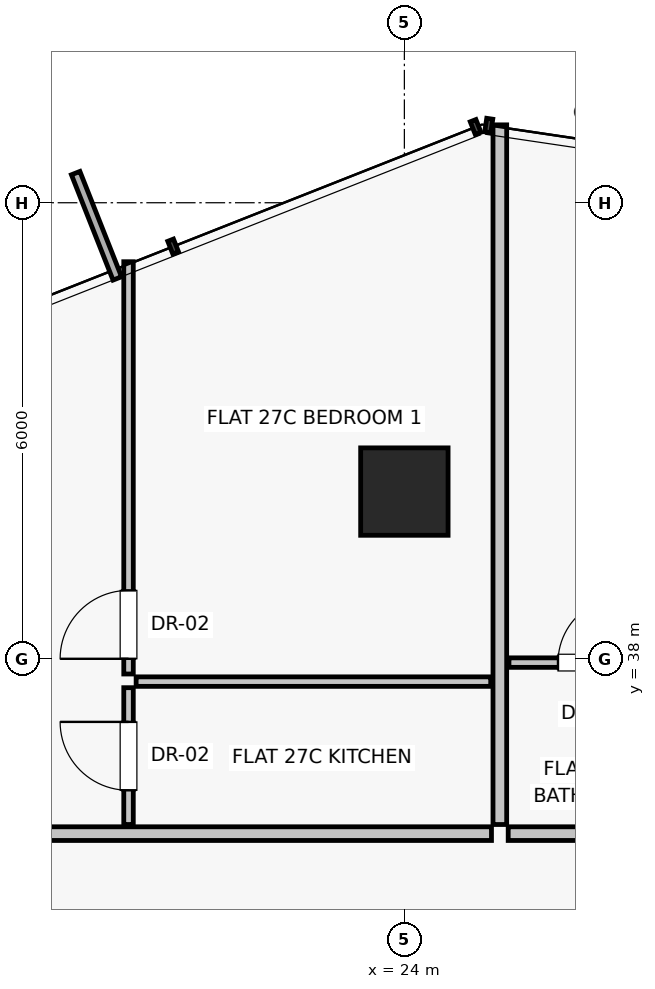
"""IFC4 building model, lengths in metres.
Left out: names, types, materials, properties, quantities, classifications, styles, units other than length and angle.
Written with IfcOpenShell. Run it as: python <this file> out.ifc"""

import sys

from ifc_helpers import new_model, si_unit, direction, frame, frame_2d, origin, origin_2d, place, context, subcontext, project, spatial, rectangle, extrude, source, transform, mapped, element, fill, save


model = new_model("IFC4")
c1 = context("Model", 3, precision=1e-05, world=origin(), true_north=direction((0.0, 1.0)))
c2 = subcontext(c1, "Body", "Model", "MODEL_VIEW")
j1 = project(units=[si_unit("LENGTHUNIT", "METRE"), si_unit("PLANEANGLEUNIT", "RADIAN")], contexts=[c1])
p1 = place(None, origin())
s1 = spatial("IfcSite", under=j1, at=p1, CompositionType="ELEMENT")
p2 = place(p1, origin())
s2 = spatial("IfcBuilding", under=s1, at=p2, CompositionType="ELEMENT")
p3 = place(p2, frame((0.0, 0.0, 99.2)))
s3 = spatial("IfcBuildingStorey", under=s2, at=p3, CompositionType="ELEMENT", Elevation=99.2)
p4 = place(p3, frame((24.0, 40.2, 0.0), z_axis=(0.0, 0.0, 1.0), x_axis=(1.0, 0.0, 0.0)))
e1 = element("IfcColumn", 1, at=p4, inside=s3, PredefinedType="COLUMN", context=c2, shape_type="SweptSolid", body=[
    extrude(rectangle(XDim=1.15, YDim=1.15, at=origin_2d()), origin(), (0.0, 0.0, 1.0), 3.25),
])
p5 = place(p3, frame((14.51, 35.7, 0.0), z_axis=(0.0, 0.0, 1.0), x_axis=(1.0, 0.0, 0.0)))
e2 = element("IfcWall", 2, at=p5, inside=s3, PredefinedType="PARTITIONING", context=c2, shape_type="SweptSolid", body=[
    extrude(rectangle(XDim=10.636, YDim=0.18, at=frame_2d((5.318, 0.0))), origin(), (0.0, 0.0, 1.0), 2.58),
])
p6 = place(p5, frame((3.525, 0.0, 0.0)))
e3 = element("IfcOpeningElement", 3, at=p6, cuts=e2, PredefinedType="OPENING", context=c2, shape_type="SweptSolid", body=[
    extrude(rectangle(XDim=0.95, YDim=2.02, at=frame_2d((0.475, 1.01))), frame((0.0, 0.1, 0.0), z_axis=(0.0, -1.0, 0.0), x_axis=(1.0, 0.0, 0.0)), (0.0, 0.0, 1.0), 0.2),
])
p7 = place(p3, frame((20.371, 35.82, 0.0), z_axis=(0.0, 0.0, 1.0), x_axis=(0.0, 1.0, 0.0)))
e4 = element("IfcWall", 4, at=p7, inside=s3, PredefinedType="PARTITIONING", context=c2, shape_type="SweptSolid", body=[
    extrude(rectangle(XDim=1.8, YDim=0.125, at=frame_2d((0.9, 0.0))), origin(), (0.0, 0.0, 1.0), 3.0),
])
p8 = place(p7, frame((0.45, 0.0, 0.0)))
e5 = element("IfcOpeningElement", 5, at=p8, cuts=e4, PredefinedType="OPENING", context=c2, shape_type="SweptSolid", body=[
    extrude(rectangle(XDim=0.9, YDim=2.01, at=frame_2d((0.45, 1.005))), frame((0.0, 0.073, 0.0), z_axis=(0.0, -1.0, 0.0), x_axis=(1.0, 0.0, 0.0)), (0.0, 0.0, 1.0), 0.145),
])
p9 = place(p3, frame((20.471, 37.7, 0.0), z_axis=(0.0, 0.0, 1.0), x_axis=(1.0, 0.0, 0.0)))
e6 = element("IfcWall", 6, at=p9, inside=s3, PredefinedType="PARTITIONING", context=c2, shape_type="SweptSolid", body=[
    extrude(rectangle(XDim=4.665, YDim=0.125, at=frame_2d((2.333, 0.0))), origin(), (0.0, 0.0, 1.0), 3.0),
])
p10 = place(p3, frame((20.371, 37.8, 0.0), z_axis=(0.0, 0.0, 1.0), x_axis=(0.0, 1.0, 0.0)))
e7 = element("IfcWall", 7, at=p10, inside=s3, PredefinedType="PARTITIONING", context=c2, shape_type="SweptSolid", body=[
    extrude(rectangle(XDim=5.424, YDim=0.125, at=frame_2d((2.712, 0.0))), origin(), (0.0, 0.0, 1.0), 3.0),
])
p11 = place(p10, frame((0.2, 0.0, 0.0)))
e8 = element("IfcOpeningElement", 8, at=p11, cuts=e7, PredefinedType="OPENING", context=c2, shape_type="SweptSolid", body=[
    extrude(rectangle(XDim=0.9, YDim=2.01, at=frame_2d((0.45, 1.005))), frame((0.0, 0.073, 0.0), z_axis=(0.0, -1.0, 0.0), x_axis=(1.0, 0.0, 0.0)), (0.0, 0.0, 1.0), 0.145),
])
p12 = place(p3, frame((25.256, 35.82, 0.0), z_axis=(0.0, 0.0, 1.0), x_axis=(0.0, 1.0, 0.0)))
e9 = element("IfcWall", 9, at=p12, inside=s3, PredefinedType="PARTITIONING", context=c2, shape_type="SweptSolid", body=[
    extrude(rectangle(XDim=9.204, YDim=0.18, at=frame_2d((4.602, 0.0))), origin(), (0.0, 0.0, 1.0), 3.0),
])
p13 = place(p3, frame((25.366, 35.7, 0.0), z_axis=(0.0, 0.0, 1.0), x_axis=(1.0, 0.0, 0.0)))
e10 = element("IfcWall", 10, at=p13, inside=s3, PredefinedType="PARTITIONING", context=c2, shape_type="SweptSolid", body=[
    extrude(rectangle(XDim=5.174, YDim=0.18, at=frame_2d((2.587, 0.0))), origin(), (0.0, 0.0, 1.0), 2.58),
])
p14 = place(p13, frame((3.03, 0.0, 0.0)))
e11 = element("IfcOpeningElement", 11, at=p14, cuts=e10, PredefinedType="OPENING", context=c2, shape_type="SweptSolid", body=[
    extrude(rectangle(XDim=0.95, YDim=2.02, at=frame_2d((0.475, 1.01))), frame((0.0, 0.1, 0.0), z_axis=(0.0, -1.0, 0.0), x_axis=(1.0, 0.0, 0.0)), (0.0, 0.0, 1.0), 0.2),
])
p15 = place(p3, frame((25.376, 37.95, 0.0), z_axis=(0.0, 0.0, 1.0), x_axis=(1.0, 0.0, 0.0)))
e12 = element("IfcWall", 12, at=p15, inside=s3, PredefinedType="PARTITIONING", context=c2, shape_type="SweptSolid", body=[
    extrude(rectangle(XDim=2.15, YDim=0.125, at=frame_2d((1.075, 0.0))), origin(), (0.0, 0.0, 1.0), 3.0),
])
p16 = place(p15, frame((0.645, 0.0, 0.0)))
e13 = element("IfcOpeningElement", 13, at=p16, cuts=e12, PredefinedType="OPENING", context=c2, shape_type="SweptSolid", body=[
    extrude(rectangle(XDim=0.86, YDim=2.01, at=frame_2d((0.43, 1.005))), frame((0.0, 0.073, 0.0), z_axis=(0.0, -1.0, 0.0), x_axis=(1.0, 0.0, 0.0)), (0.0, 0.0, 1.0), 0.145),
])
m1 = source(origin(), c2, "Body", "SweptSolid", [
    extrude(rectangle(XDim=0.9, YDim=2.01, at=frame_2d((0.45, 1.005))), frame((0.0, 0.025, 0.0), z_axis=(0.0, -1.0, 0.0), x_axis=(1.0, 0.0, 0.0)), (0.0, 0.0, 1.0), 0.05),
])
p17 = place(p8, origin())
e14 = element("IfcDoor", 14, at=p17, inside=s3, OperationType="SINGLE_SWING_RIGHT", PredefinedType="DOOR", context=c2, shape_type="MappedRepresentation", body=[
    mapped(m1, transform((0.0, 0.0, 0.0), scale=1.0)),
])
fill(e5, e14)
p18 = place(p11, origin())
e15 = element("IfcDoor", 15, at=p18, inside=s3, OperationType="SINGLE_SWING_LEFT", PredefinedType="DOOR", context=c2, shape_type="MappedRepresentation", body=[
    mapped(m1, transform((0.0, 0.0, 0.0), scale=1.0)),
])
fill(e8, e15)
m2 = source(origin(), c2, "Body", "SweptSolid", [
    extrude(rectangle(XDim=0.86, YDim=2.01, at=frame_2d((0.43, 1.005))), frame((0.0, 0.025, 0.0), z_axis=(0.0, -1.0, 0.0), x_axis=(1.0, 0.0, 0.0)), (0.0, 0.0, 1.0), 0.05),
])
p19 = place(p16, origin())
e16 = element("IfcDoor", 16, at=p19, inside=s3, OperationType="SINGLE_SWING_RIGHT", PredefinedType="DOOR", context=c2, shape_type="MappedRepresentation", body=[
    mapped(m2, transform((0.0, 0.0, 0.0), scale=1.0)),
])
fill(e13, e16)
save(model, sys.argv[1])
